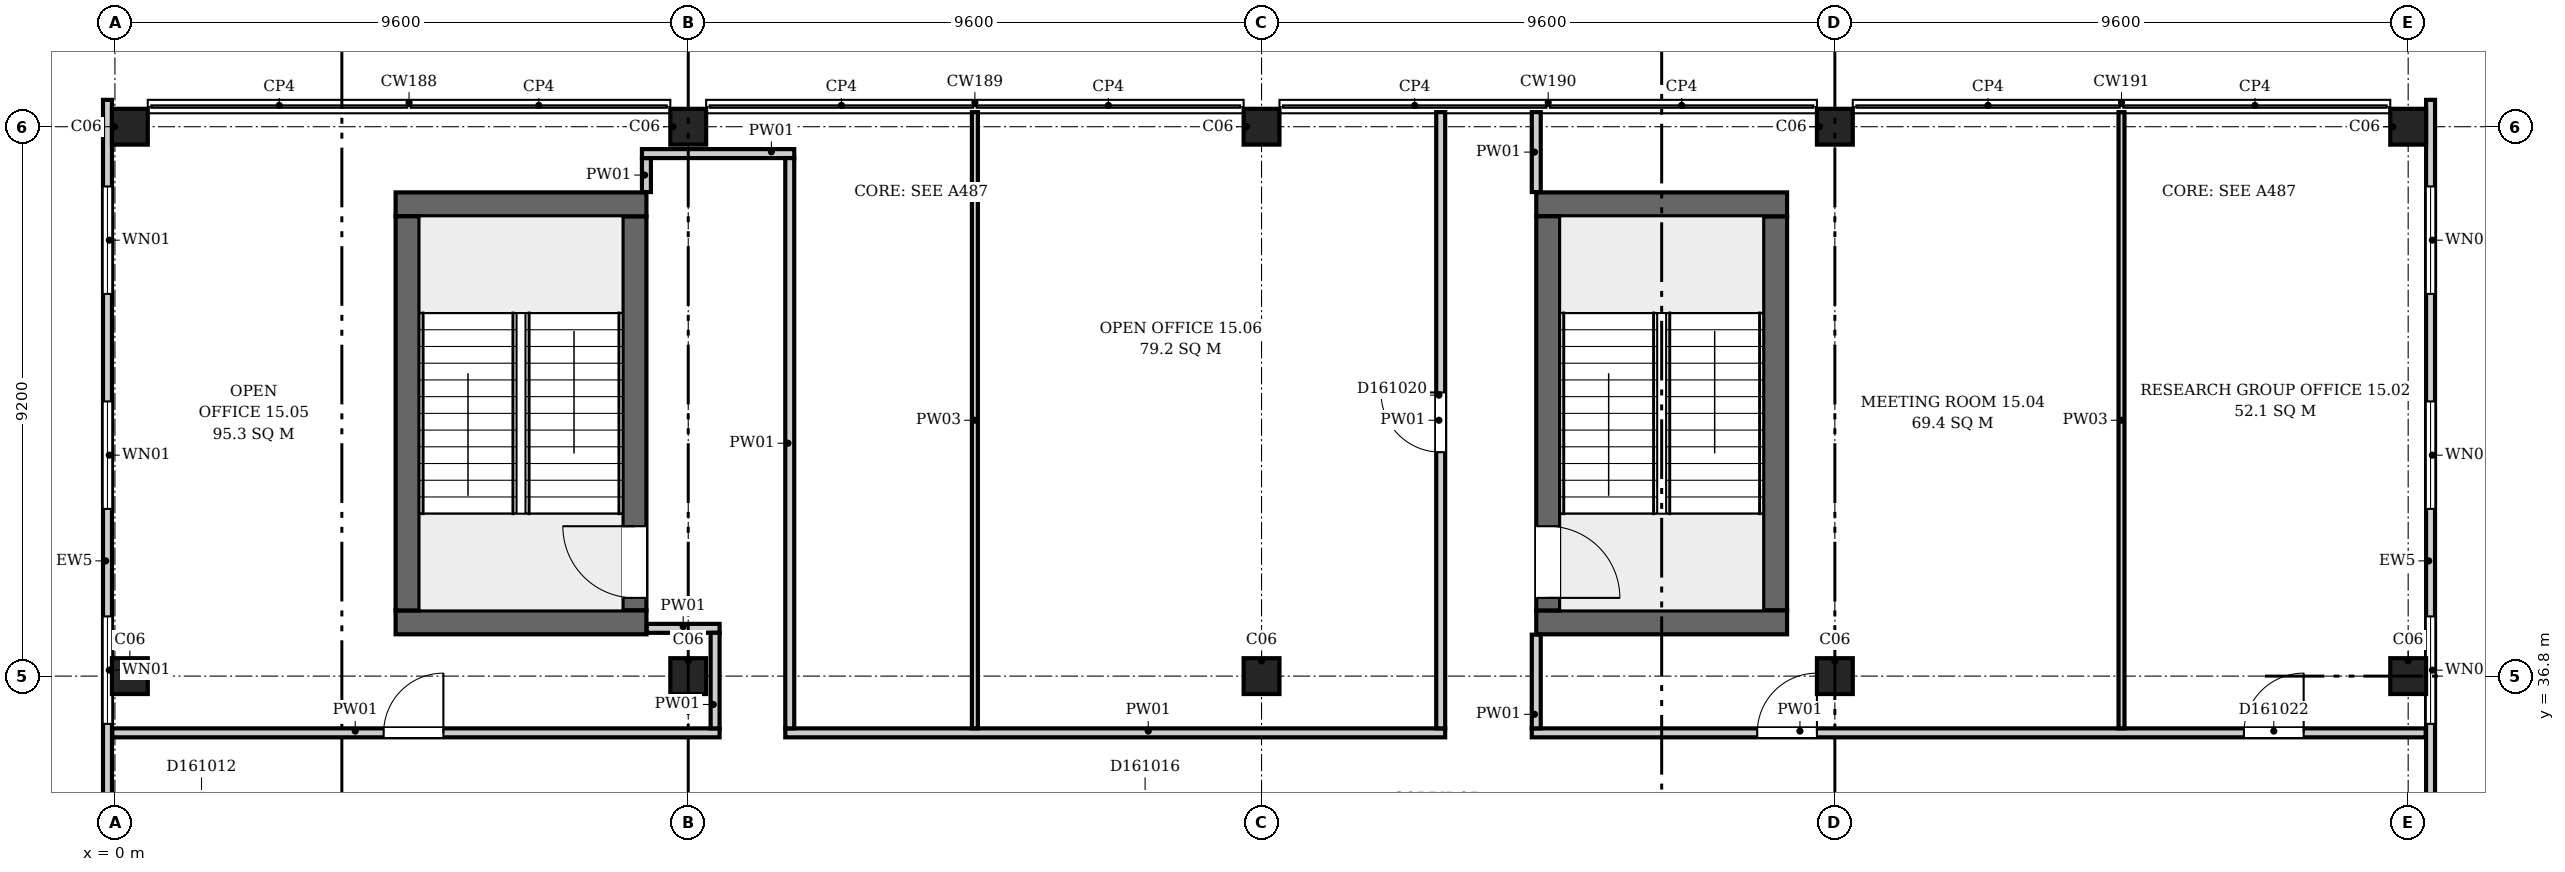
"""IFC4 building model, lengths in metres.
Left out: names, types, materials, properties, quantities, classifications, styles, units other than length and angle.
Written with IfcOpenShell. Run it as: python <this file> out.ifc"""

import sys

from ifc_helpers import new_model, si_unit, direction, frame, frame_2d, origin, origin_2d, place, context, subcontext, project, spatial, rectangle, extrude, element, fill, save


model = new_model("IFC4")
c1 = context("Model", 3, precision=1e-05, world=origin(), true_north=direction((0.0, 1.0)))
c2 = subcontext(c1, "Body", "Model", "MODEL_VIEW")
j1 = project(units=[si_unit("LENGTHUNIT", "METRE"), si_unit("PLANEANGLEUNIT", "RADIAN")], contexts=[c1])
p1 = place(None, origin())
s1 = spatial("IfcSite", under=j1, at=p1, CompositionType="ELEMENT")
p2 = place(p1, origin())
s2 = spatial("IfcBuilding", under=s1, at=p2, CompositionType="ELEMENT")
p3 = place(p2, frame((0.0, 0.0, 73.9)))
s3 = spatial("IfcBuildingStorey", under=s2, at=p3, CompositionType="ELEMENT", Elevation=73.9)
for number, where, z_axis, x_axis in (
    (1, (4.7, 37.7, 0.0), (0.0, 0.0, 1.0), (1.0, 0.0, 0.0)),
    (2, (4.7, 44.7, 0.0), (0.0, 0.0, 1.0), (1.0, 0.0, 0.0)),
):
    element("IfcWall", number, at=place(p3, frame(where, z_axis=z_axis, x_axis=x_axis)), inside=s3, PredefinedType="SHEAR", context=c2, shape_type="SweptSolid", body=[
        extrude(rectangle(XDim=4.2, YDim=0.4, at=frame_2d((2.1, 0.0))), origin(), (0.0, 0.0, 1.0), 4.2),
    ])
p4 = place(p3, frame((4.9, 37.9, 0.0), z_axis=(0.0, 0.0, 1.0), x_axis=(0.0, 1.0, 0.0)))
e3 = element("IfcWall", 3, at=p4, inside=s3, PredefinedType="SHEAR", context=c2, shape_type="SweptSolid", body=[
    extrude(rectangle(XDim=6.6, YDim=0.4, at=frame_2d((3.3, 0.0))), origin(), (0.0, 0.0, 1.0), 4.2),
])
p5 = place(p3, frame((8.7, 37.9, 0.0), z_axis=(0.0, 0.0, 1.0), x_axis=(0.0, 1.0, 0.0)))
e4 = element("IfcWall", 4, at=p5, inside=s3, PredefinedType="SHEAR", context=c2, shape_type="SweptSolid", body=[
    extrude(rectangle(XDim=6.6, YDim=0.4, at=frame_2d((3.3, 0.0))), origin(), (0.0, 0.0, 1.0), 4.2),
])
p6 = place(p5, frame((0.21, 0.0, 0.0)))
e5 = element("IfcOpeningElement", 5, at=p6, cuts=e4, PredefinedType="OPENING", context=c2, shape_type="SweptSolid", body=[
    extrude(rectangle(XDim=1.2, YDim=2.1, at=frame_2d((0.6, 1.05))), frame((0.0, 0.21, 0.0), z_axis=(0.0, -1.0, 0.0), x_axis=(1.0, 0.0, 0.0)), (0.0, 0.0, 1.0), 0.42),
])
for number, where, z_axis, x_axis in (
    (6, (23.8, 37.7, 0.0), (0.0, 0.0, 1.0), (1.0, 0.0, 0.0)),
    (7, (23.8, 44.7, 0.0), (0.0, 0.0, 1.0), (1.0, 0.0, 0.0)),
):
    element("IfcWall", number, at=place(p3, frame(where, z_axis=z_axis, x_axis=x_axis)), inside=s3, PredefinedType="SHEAR", context=c2, shape_type="SweptSolid", body=[
        extrude(rectangle(XDim=4.2, YDim=0.4, at=frame_2d((2.1, 0.0))), origin(), (0.0, 0.0, 1.0), 4.2),
    ])
p7 = place(p3, frame((24.0, 37.9, 0.0), z_axis=(0.0, 0.0, 1.0), x_axis=(0.0, 1.0, 0.0)))
e8 = element("IfcWall", 8, at=p7, inside=s3, PredefinedType="SHEAR", context=c2, shape_type="SweptSolid", body=[
    extrude(rectangle(XDim=6.6, YDim=0.4, at=frame_2d((3.3, 0.0))), origin(), (0.0, 0.0, 1.0), 4.2),
])
p8 = place(p7, frame((0.21, 0.0, 0.0)))
e9 = element("IfcOpeningElement", 9, at=p8, cuts=e8, PredefinedType="OPENING", context=c2, shape_type="SweptSolid", body=[
    extrude(rectangle(XDim=1.2, YDim=2.1, at=frame_2d((0.6, 1.05))), frame((0.0, 0.21, 0.0), z_axis=(0.0, -1.0, 0.0), x_axis=(1.0, 0.0, 0.0)), (0.0, 0.0, 1.0), 0.42),
])
p9 = place(p3, frame((27.8, 37.9, 0.0), z_axis=(0.0, 0.0, 1.0), x_axis=(0.0, 1.0, 0.0)))
e10 = element("IfcWall", 10, at=p9, inside=s3, PredefinedType="SHEAR", context=c2, shape_type="SweptSolid", body=[
    extrude(rectangle(XDim=6.6, YDim=0.4, at=frame_2d((3.3, 0.0))), origin(), (0.0, 0.0, 1.0), 4.2),
])
for number, where, z_axis, x_axis in (
    (11, (0.25, 36.8, 0.0), (0.0, 0.0, 1.0), (1.0, 0.0, 0.0)),
    (12, (9.6, 36.8, 0.0), (0.0, 0.0, 1.0), (1.0, 0.0, 0.0)),
    (13, (19.2, 36.8, 0.0), (0.0, 0.0, 1.0), (1.0, 0.0, 0.0)),
    (14, (28.8, 36.8, 0.0), (0.0, 0.0, 1.0), (1.0, 0.0, 0.0)),
    (15, (38.4, 36.8, 0.0), (0.0, 0.0, 1.0), (1.0, 0.0, 0.0)),
    (16, (0.25, 46.0, 0.0), (0.0, 0.0, 1.0), (1.0, 0.0, 0.0)),
    (17, (9.6, 46.0, 0.0), (0.0, 0.0, 1.0), (1.0, 0.0, 0.0)),
    (18, (19.2, 46.0, 0.0), (0.0, 0.0, 1.0), (1.0, 0.0, 0.0)),
    (19, (28.8, 46.0, 0.0), (0.0, 0.0, 1.0), (1.0, 0.0, 0.0)),
    (20, (38.4, 46.0, 0.0), (0.0, 0.0, 1.0), (1.0, 0.0, 0.0)),
):
    element("IfcColumn", number, at=place(p3, frame(where, z_axis=z_axis, x_axis=x_axis)), inside=s3, PredefinedType="COLUMN", context=c2, shape_type="SweptSolid", body=[
        extrude(rectangle(XDim=0.6, YDim=0.6, at=origin_2d()), origin(), (0.0, 0.0, 1.0), 4.2),
    ])
p10 = place(p3, frame((-0.125, 46.45, 0.0), z_axis=(0.0, 0.0, 1.0), x_axis=(0.0, -1.0, 0.0)))
e21 = element("IfcWall", 21, at=p10, inside=s3, PredefinedType="ELEMENTEDWALL", context=c2, shape_type="SweptSolid", body=[
    extrude(rectangle(XDim=19.3, YDim=0.15, at=frame_2d((9.65, 0.0))), origin(), (0.0, 0.0, 1.0), 3.9),
])
p11 = place(p10, frame((15.85, 0.0, 0.9)))
e22 = element("IfcOpeningElement", 22, at=p11, cuts=e21, PredefinedType="OPENING", context=c2, shape_type="SweptSolid", body=[
    extrude(rectangle(XDim=1.8, YDim=2.6, at=frame_2d((0.9, 1.3))), frame((0.0, 0.085, 0.0), z_axis=(0.0, -1.0, 0.0), x_axis=(1.0, 0.0, 0.0)), (0.0, 0.0, 1.0), 0.17),
])
p12 = place(p10, frame((12.25, 0.0, 0.9)))
e23 = element("IfcOpeningElement", 23, at=p12, cuts=e21, PredefinedType="OPENING", context=c2, shape_type="SweptSolid", body=[
    extrude(rectangle(XDim=1.8, YDim=2.6, at=frame_2d((0.9, 1.3))), frame((0.0, 0.085, 0.0), z_axis=(0.0, -1.0, 0.0), x_axis=(1.0, 0.0, 0.0)), (0.0, 0.0, 1.0), 0.17),
])
p13 = place(p10, frame((8.65, 0.0, 0.9)))
e24 = element("IfcOpeningElement", 24, at=p13, cuts=e21, PredefinedType="OPENING", context=c2, shape_type="SweptSolid", body=[
    extrude(rectangle(XDim=1.8, YDim=2.6, at=frame_2d((0.9, 1.3))), frame((0.0, 0.085, 0.0), z_axis=(0.0, -1.0, 0.0), x_axis=(1.0, 0.0, 0.0)), (0.0, 0.0, 1.0), 0.17),
])
p14 = place(p10, frame((5.05, 0.0, 0.9)))
e25 = element("IfcOpeningElement", 25, at=p14, cuts=e21, PredefinedType="OPENING", context=c2, shape_type="SweptSolid", body=[
    extrude(rectangle(XDim=1.8, YDim=2.6, at=frame_2d((0.9, 1.3))), frame((0.0, 0.085, 0.0), z_axis=(0.0, -1.0, 0.0), x_axis=(1.0, 0.0, 0.0)), (0.0, 0.0, 1.0), 0.17),
])
p15 = place(p10, frame((1.45, 0.0, 0.9)))
e26 = element("IfcOpeningElement", 26, at=p15, cuts=e21, PredefinedType="OPENING", context=c2, shape_type="SweptSolid", body=[
    extrude(rectangle(XDim=1.8, YDim=2.6, at=frame_2d((0.9, 1.3))), frame((0.0, 0.085, 0.0), z_axis=(0.0, -1.0, 0.0), x_axis=(1.0, 0.0, 0.0)), (0.0, 0.0, 1.0), 0.17),
])
p16 = place(p3, frame((38.775, 27.15, 0.0), z_axis=(0.0, 0.0, 1.0), x_axis=(0.0, 1.0, 0.0)))
e27 = element("IfcWall", 27, at=p16, inside=s3, PredefinedType="ELEMENTEDWALL", context=c2, shape_type="SweptSolid", body=[
    extrude(rectangle(XDim=19.3, YDim=0.15, at=frame_2d((9.65, 0.0))), origin(), (0.0, 0.0, 1.0), 3.9),
])
p17 = place(p16, frame((1.65, 0.0, 0.9)))
e28 = element("IfcOpeningElement", 28, at=p17, cuts=e27, PredefinedType="OPENING", context=c2, shape_type="SweptSolid", body=[
    extrude(rectangle(XDim=1.8, YDim=2.6, at=frame_2d((0.9, 1.3))), frame((0.0, 0.085, 0.0), z_axis=(0.0, -1.0, 0.0), x_axis=(1.0, 0.0, 0.0)), (0.0, 0.0, 1.0), 0.17),
])
p18 = place(p16, frame((5.25, 0.0, 0.9)))
e29 = element("IfcOpeningElement", 29, at=p18, cuts=e27, PredefinedType="OPENING", context=c2, shape_type="SweptSolid", body=[
    extrude(rectangle(XDim=1.8, YDim=2.6, at=frame_2d((0.9, 1.3))), frame((0.0, 0.085, 0.0), z_axis=(0.0, -1.0, 0.0), x_axis=(1.0, 0.0, 0.0)), (0.0, 0.0, 1.0), 0.17),
])
p19 = place(p16, frame((8.85, 0.0, 0.9)))
e30 = element("IfcOpeningElement", 30, at=p19, cuts=e27, PredefinedType="OPENING", context=c2, shape_type="SweptSolid", body=[
    extrude(rectangle(XDim=1.8, YDim=2.6, at=frame_2d((0.9, 1.3))), frame((0.0, 0.085, 0.0), z_axis=(0.0, -1.0, 0.0), x_axis=(1.0, 0.0, 0.0)), (0.0, 0.0, 1.0), 0.17),
])
p20 = place(p16, frame((12.45, 0.0, 0.9)))
e31 = element("IfcOpeningElement", 31, at=p20, cuts=e27, PredefinedType="OPENING", context=c2, shape_type="SweptSolid", body=[
    extrude(rectangle(XDim=1.8, YDim=2.6, at=frame_2d((0.9, 1.3))), frame((0.0, 0.085, 0.0), z_axis=(0.0, -1.0, 0.0), x_axis=(1.0, 0.0, 0.0)), (0.0, 0.0, 1.0), 0.17),
])
p21 = place(p16, frame((16.05, 0.0, 0.9)))
e32 = element("IfcOpeningElement", 32, at=p21, cuts=e27, PredefinedType="OPENING", context=c2, shape_type="SweptSolid", body=[
    extrude(rectangle(XDim=1.8, YDim=2.6, at=frame_2d((0.9, 1.3))), frame((0.0, 0.085, 0.0), z_axis=(0.0, -1.0, 0.0), x_axis=(1.0, 0.0, 0.0)), (0.0, 0.0, 1.0), 0.17),
])
p22 = place(p3, frame((-0.044, 35.85, 0.0), z_axis=(0.0, 0.0, 1.0), x_axis=(1.0, 0.0, 0.0)))
e33 = element("IfcWall", 33, at=p22, inside=s3, PredefinedType="PARTITIONING", context=c2, shape_type="SweptSolid", body=[
    extrude(rectangle(XDim=10.169, YDim=0.15, at=frame_2d((5.084, 0.0))), origin(), (0.0, 0.0, 1.0), 3.9),
])
p23 = place(p22, frame((4.544, 0.0, 0.0)))
e34 = element("IfcOpeningElement", 34, at=p23, cuts=e33, PredefinedType="OPENING", context=c2, shape_type="SweptSolid", body=[
    extrude(rectangle(XDim=1.0, YDim=2.1, at=frame_2d((0.5, 1.05))), frame((0.0, 0.085, 0.0), z_axis=(0.0, -1.0, 0.0), x_axis=(1.0, 0.0, 0.0)), (0.0, 0.0, 1.0), 0.17),
])
p24 = place(p3, frame((8.9, 44.906, 0.0), z_axis=(0.0, 0.0, 1.0), x_axis=(0.0, 1.0, 0.0)))
e35 = element("IfcWall", 35, at=p24, inside=s3, PredefinedType="PARTITIONING", context=c2, shape_type="SweptSolid", body=[
    extrude(rectangle(XDim=0.569, YDim=0.15, at=frame_2d((0.285, 0.0))), origin(), (0.0, 0.0, 1.0), 3.9),
])
p25 = place(p3, frame((8.825, 45.55, 0.0), z_axis=(0.0, 0.0, 1.0), x_axis=(1.0, 0.0, 0.0)))
e36 = element("IfcWall", 36, at=p25, inside=s3, PredefinedType="PARTITIONING", context=c2, shape_type="SweptSolid", body=[
    extrude(rectangle(XDim=2.55, YDim=0.15, at=frame_2d((1.275, 0.0))), origin(), (0.0, 0.0, 1.0), 3.9),
])
p26 = place(p3, frame((8.906, 37.6, 0.0), z_axis=(0.0, 0.0, 1.0), x_axis=(1.0, 0.0, 0.0)))
e37 = element("IfcWall", 37, at=p26, inside=s3, PredefinedType="PARTITIONING", context=c2, shape_type="SweptSolid", body=[
    extrude(rectangle(XDim=1.219, YDim=0.15, at=frame_2d((0.609, 0.0))), origin(), (0.0, 0.0, 1.0), 3.9),
])
p27 = place(p3, frame((10.05, 35.925, 0.0), z_axis=(0.0, 0.0, 1.0), x_axis=(0.0, 1.0, 0.0)))
e38 = element("IfcWall", 38, at=p27, inside=s3, PredefinedType="PARTITIONING", context=c2, shape_type="SweptSolid", body=[
    extrude(rectangle(XDim=1.6, YDim=0.15, at=frame_2d((0.8, 0.0))), origin(), (0.0, 0.0, 1.0), 3.9),
])
p28 = place(p3, frame((11.225, 35.85, 0.0), z_axis=(0.0, 0.0, 1.0), x_axis=(1.0, 0.0, 0.0)))
e39 = element("IfcWall", 39, at=p28, inside=s3, PredefinedType="PARTITIONING", context=c2, shape_type="SweptSolid", body=[
    extrude(rectangle(XDim=11.05, YDim=0.15, at=frame_2d((5.525, 0.0))), origin(), (0.0, 0.0, 1.0), 3.9),
])
p29 = place(p3, frame((11.3, 35.925, 0.0), z_axis=(0.0, 0.0, 1.0), x_axis=(0.0, 1.0, 0.0)))
e40 = element("IfcWall", 40, at=p29, inside=s3, PredefinedType="PARTITIONING", context=c2, shape_type="SweptSolid", body=[
    extrude(rectangle(XDim=9.55, YDim=0.15, at=frame_2d((4.775, 0.0))), origin(), (0.0, 0.0, 1.0), 3.9),
])
p30 = place(p3, frame((14.4, 35.925, 0.0), z_axis=(0.0, 0.0, 1.0), x_axis=(0.0, 1.0, 0.0)))
e41 = element("IfcWall", 41, at=p30, inside=s3, PredefinedType="PARTITIONING", context=c2, shape_type="SweptSolid", body=[
    extrude(rectangle(XDim=10.319, YDim=0.1, at=frame_2d((5.159, 0.0))), origin(), (0.0, 0.0, 1.0), 3.9),
])
p31 = place(p3, frame((22.2, 35.925, 0.0), z_axis=(0.0, 0.0, 1.0), x_axis=(0.0, 1.0, 0.0)))
e42 = element("IfcWall", 42, at=p31, inside=s3, PredefinedType="PARTITIONING", context=c2, shape_type="SweptSolid", body=[
    extrude(rectangle(XDim=10.319, YDim=0.15, at=frame_2d((5.159, 0.0))), origin(), (0.0, 0.0, 1.0), 3.9),
])
p32 = place(p31, frame((4.625, 0.0, 0.0)))
e43 = element("IfcOpeningElement", 43, at=p32, cuts=e42, PredefinedType="OPENING", context=c2, shape_type="SweptSolid", body=[
    extrude(rectangle(XDim=1.0, YDim=2.1, at=frame_2d((0.5, 1.05))), frame((0.0, 0.085, 0.0), z_axis=(0.0, -1.0, 0.0), x_axis=(1.0, 0.0, 0.0)), (0.0, 0.0, 1.0), 0.17),
])
p33 = place(p3, frame((23.725, 35.85, 0.0), z_axis=(0.0, 0.0, 1.0), x_axis=(1.0, 0.0, 0.0)))
e44 = element("IfcWall", 44, at=p33, inside=s3, PredefinedType="PARTITIONING", context=c2, shape_type="SweptSolid", body=[
    extrude(rectangle(XDim=14.969, YDim=0.15, at=frame_2d((7.484, 0.0))), origin(), (0.0, 0.0, 1.0), 3.9),
])
p34 = place(p33, frame((3.775, 0.0, 0.0)))
e45 = element("IfcOpeningElement", 45, at=p34, cuts=e44, PredefinedType="OPENING", context=c2, shape_type="SweptSolid", body=[
    extrude(rectangle(XDim=1.0, YDim=2.1, at=frame_2d((0.5, 1.05))), frame((0.0, 0.085, 0.0), z_axis=(0.0, -1.0, 0.0), x_axis=(1.0, 0.0, 0.0)), (0.0, 0.0, 1.0), 0.17),
])
p35 = place(p33, frame((11.925, 0.0, 0.0)))
e46 = element("IfcOpeningElement", 46, at=p35, cuts=e44, PredefinedType="OPENING", context=c2, shape_type="SweptSolid", body=[
    extrude(rectangle(XDim=1.0, YDim=2.1, at=frame_2d((0.5, 1.05))), frame((0.0, 0.085, 0.0), z_axis=(0.0, -1.0, 0.0), x_axis=(1.0, 0.0, 0.0)), (0.0, 0.0, 1.0), 0.17),
])
p36 = place(p3, frame((23.8, 35.925, 0.0), z_axis=(0.0, 0.0, 1.0), x_axis=(0.0, 1.0, 0.0)))
e47 = element("IfcWall", 47, at=p36, inside=s3, PredefinedType="PARTITIONING", context=c2, shape_type="SweptSolid", body=[
    extrude(rectangle(XDim=1.569, YDim=0.15, at=frame_2d((0.784, 0.0))), origin(), (0.0, 0.0, 1.0), 3.9),
])
p37 = place(p3, frame((23.8, 44.906, 0.0), z_axis=(0.0, 0.0, 1.0), x_axis=(0.0, 1.0, 0.0)))
e48 = element("IfcWall", 48, at=p37, inside=s3, PredefinedType="PARTITIONING", context=c2, shape_type="SweptSolid", body=[
    extrude(rectangle(XDim=1.338, YDim=0.15, at=frame_2d((0.669, 0.0))), origin(), (0.0, 0.0, 1.0), 3.9),
])
p38 = place(p3, frame((33.6, 35.925, 0.0), z_axis=(0.0, 0.0, 1.0), x_axis=(0.0, 1.0, 0.0)))
e49 = element("IfcWall", 49, at=p38, inside=s3, PredefinedType="PARTITIONING", context=c2, shape_type="SweptSolid", body=[
    extrude(rectangle(XDim=10.319, YDim=0.1, at=frame_2d((5.159, 0.0))), origin(), (0.0, 0.0, 1.0), 3.9),
])
p39 = place(p13, origin())
e50 = element("IfcWindow", 50, at=p39, inside=s3, PartitioningType="SINGLE_PANEL", PredefinedType="WINDOW", context=c2, shape_type="SweptSolid", body=[
    extrude(rectangle(XDim=1.8, YDim=2.6, at=frame_2d((0.9, 1.3))), frame((0.0, 0.03, 0.0), z_axis=(0.0, -1.0, 0.0), x_axis=(1.0, 0.0, 0.0)), (0.0, 0.0, 1.0), 0.06),
])
fill(e24, e50)
p40 = place(p14, origin())
e51 = element("IfcWindow", 51, at=p40, inside=s3, PartitioningType="SINGLE_PANEL", PredefinedType="WINDOW", context=c2, shape_type="SweptSolid", body=[
    extrude(rectangle(XDim=1.8, YDim=2.6, at=frame_2d((0.9, 1.3))), frame((0.0, 0.03, 0.0), z_axis=(0.0, -1.0, 0.0), x_axis=(1.0, 0.0, 0.0)), (0.0, 0.0, 1.0), 0.06),
])
fill(e25, e51)
p41 = place(p15, origin())
e52 = element("IfcWindow", 52, at=p41, inside=s3, PartitioningType="SINGLE_PANEL", PredefinedType="WINDOW", context=c2, shape_type="SweptSolid", body=[
    extrude(rectangle(XDim=1.8, YDim=2.6, at=frame_2d((0.9, 1.3))), frame((0.0, 0.03, 0.0), z_axis=(0.0, -1.0, 0.0), x_axis=(1.0, 0.0, 0.0)), (0.0, 0.0, 1.0), 0.06),
])
fill(e26, e52)
p42 = place(p19, origin())
e53 = element("IfcWindow", 53, at=p42, inside=s3, PartitioningType="SINGLE_PANEL", PredefinedType="WINDOW", context=c2, shape_type="SweptSolid", body=[
    extrude(rectangle(XDim=1.8, YDim=2.6, at=frame_2d((0.9, 1.3))), frame((0.0, 0.03, 0.0), z_axis=(0.0, -1.0, 0.0), x_axis=(1.0, 0.0, 0.0)), (0.0, 0.0, 1.0), 0.06),
])
fill(e30, e53)
p43 = place(p20, origin())
e54 = element("IfcWindow", 54, at=p43, inside=s3, PartitioningType="SINGLE_PANEL", PredefinedType="WINDOW", context=c2, shape_type="SweptSolid", body=[
    extrude(rectangle(XDim=1.8, YDim=2.6, at=frame_2d((0.9, 1.3))), frame((0.0, 0.03, 0.0), z_axis=(0.0, -1.0, 0.0), x_axis=(1.0, 0.0, 0.0)), (0.0, 0.0, 1.0), 0.06),
])
fill(e31, e54)
p44 = place(p21, origin())
e55 = element("IfcWindow", 55, at=p44, inside=s3, PartitioningType="SINGLE_PANEL", PredefinedType="WINDOW", context=c2, shape_type="SweptSolid", body=[
    extrude(rectangle(XDim=1.8, YDim=2.6, at=frame_2d((0.9, 1.3))), frame((0.0, 0.03, 0.0), z_axis=(0.0, -1.0, 0.0), x_axis=(1.0, 0.0, 0.0)), (0.0, 0.0, 1.0), 0.06),
])
fill(e32, e55)
p45 = place(p6, origin())
e56 = element("IfcDoor", 56, at=p45, inside=s3, OperationType="SINGLE_SWING_RIGHT", PredefinedType="DOOR", context=c2, shape_type="SweptSolid", body=[
    extrude(rectangle(XDim=1.2, YDim=2.1, at=frame_2d((0.6, 1.05))), frame((0.0, 0.025, 0.0), z_axis=(0.0, -1.0, 0.0), x_axis=(1.0, 0.0, 0.0)), (0.0, 0.0, 1.0), 0.05),
])
fill(e5, e56)
p46 = place(p8, origin())
e57 = element("IfcDoor", 57, at=p46, inside=s3, OperationType="SINGLE_SWING_LEFT", PredefinedType="DOOR", context=c2, shape_type="SweptSolid", body=[
    extrude(rectangle(XDim=1.2, YDim=2.1, at=frame_2d((0.6, 1.05))), frame((0.0, 0.025, 0.0), z_axis=(0.0, -1.0, 0.0), x_axis=(1.0, 0.0, 0.0)), (0.0, 0.0, 1.0), 0.05),
])
fill(e9, e57)
p47 = place(p23, origin())
e58 = element("IfcDoor", 58, at=p47, inside=s3, OperationType="SINGLE_SWING_LEFT", PredefinedType="DOOR", context=c2, shape_type="SweptSolid", body=[
    extrude(rectangle(XDim=1.0, YDim=2.1, at=frame_2d((0.5, 1.05))), frame((0.0, 0.025, 0.0), z_axis=(0.0, -1.0, 0.0), x_axis=(1.0, 0.0, 0.0)), (0.0, 0.0, 1.0), 0.05),
])
fill(e34, e58)
p48 = place(p32, origin())
e59 = element("IfcDoor", 59, at=p48, inside=s3, OperationType="SINGLE_SWING_RIGHT", PredefinedType="DOOR", context=c2, shape_type="SweptSolid", body=[
    extrude(rectangle(XDim=1.0, YDim=2.1, at=frame_2d((0.5, 1.05))), frame((0.0, 0.025, 0.0), z_axis=(0.0, -1.0, 0.0), x_axis=(1.0, 0.0, 0.0)), (0.0, 0.0, 1.0), 0.05),
])
fill(e43, e59)
p49 = place(p34, origin())
e60 = element("IfcDoor", 60, at=p49, inside=s3, OperationType="SINGLE_SWING_RIGHT", PredefinedType="DOOR", context=c2, shape_type="SweptSolid", body=[
    extrude(rectangle(XDim=1.0, YDim=2.1, at=frame_2d((0.5, 1.05))), frame((0.0, 0.025, 0.0), z_axis=(0.0, -1.0, 0.0), x_axis=(1.0, 0.0, 0.0)), (0.0, 0.0, 1.0), 0.05),
])
fill(e45, e60)
p50 = place(p35, origin())
e61 = element("IfcDoor", 61, at=p50, inside=s3, OperationType="SINGLE_SWING_RIGHT", PredefinedType="DOOR", context=c2, shape_type="SweptSolid", body=[
    extrude(rectangle(XDim=1.0, YDim=2.1, at=frame_2d((0.5, 1.05))), frame((0.0, 0.025, 0.0), z_axis=(0.0, -1.0, 0.0), x_axis=(1.0, 0.0, 0.0)), (0.0, 0.0, 1.0), 0.05),
])
fill(e46, e61)
save(model, sys.argv[1])
